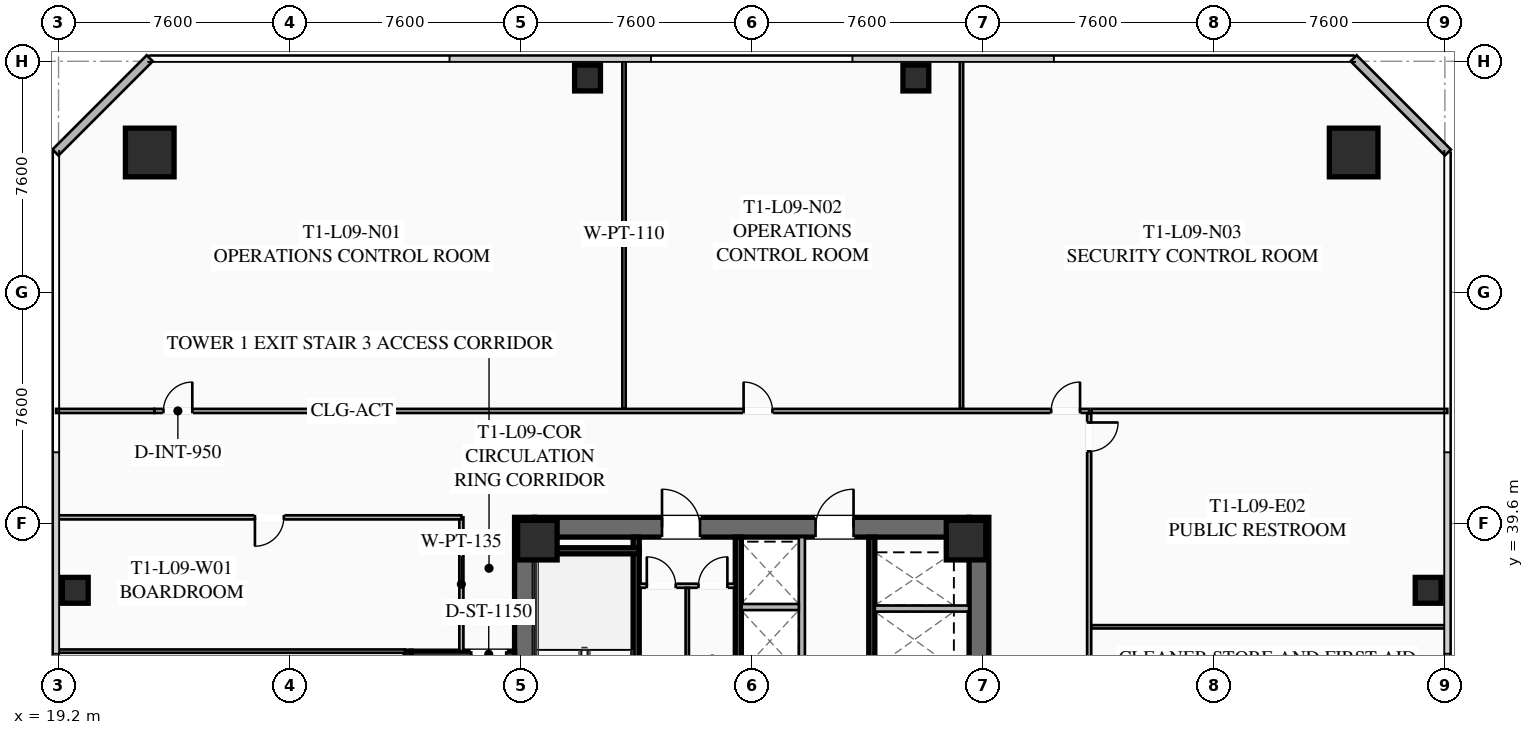
"""IFC4 building model, lengths in metres.
Left out: names, types, materials, properties, quantities, classifications, styles, units other than length and angle.
Written with IfcOpenShell. Run it as: python <this file> out.ifc"""

import sys

from ifc_helpers import new_model, si_unit, direction, frame, frame_2d, origin, origin_2d, place, context, subcontext, project, spatial, rectangle, hollow_rectangle, extrude, element, fill, save


model = new_model("IFC4")
c1 = context("Model", 3, precision=1e-05, world=origin(), true_north=direction((0.0, 1.0)))
c2 = subcontext(c1, "Body", "Model", "MODEL_VIEW")
j1 = project(units=[si_unit("LENGTHUNIT", "METRE"), si_unit("PLANEANGLEUNIT", "RADIAN")], contexts=[c1])
p1 = place(None, origin())
s1 = spatial("IfcSite", under=j1, at=p1, CompositionType="ELEMENT")
p2 = place(p1, origin())
s2 = spatial("IfcBuilding", under=s1, at=p2, CompositionType="ELEMENT")
p3 = place(p2, frame((0.0, 0.0, 38.8)))
s3 = spatial("IfcBuildingStorey", under=s2, at=p3, CompositionType="ELEMENT", Elevation=38.8)
for number, where, z_axis, x_axis in (
    (1, (34.525, 24.2, 0.0), (0.0, 0.0, 1.0), (0.0, 1.0, 0.0)),
    (2, (49.475, 39.8, 0.0), (0.0, 0.0, 1.0), (0.0, -1.0, 0.0)),
):
    element("IfcWall", number, at=place(p3, frame(where, z_axis=z_axis, x_axis=x_axis)), inside=s3, PredefinedType="SHEAR", context=c2, shape_type="SweptSolid", body=[
        extrude(rectangle(XDim=15.6, YDim=0.65, at=frame_2d((7.8, 0.0))), origin(), (0.0, 0.0, 1.0), 3.55),
    ])
p4 = place(p3, frame((34.85, 39.475, 0.0), z_axis=(0.0, 0.0, 1.0), x_axis=(1.0, 0.0, 0.0)))
e3 = element("IfcWall", 3, at=p4, inside=s3, PredefinedType="SHEAR", context=c2, shape_type="SweptSolid", body=[
    extrude(rectangle(XDim=14.3, YDim=0.65, at=frame_2d((7.15, 0.0))), origin(), (0.0, 0.0, 1.0), 3.55),
])
p5 = place(p4, frame((4.2, 0.0, 0.0)))
e4 = element("IfcOpeningElement", 4, at=p5, cuts=e3, PredefinedType="OPENING", context=c2, shape_type="SweptSolid", body=[
    extrude(rectangle(XDim=1.25, YDim=2.25, at=frame_2d((0.625, 1.125))), frame((0.0, 0.335, 0.0), z_axis=(0.0, -1.0, 0.0), x_axis=(1.0, 0.0, 0.0)), (0.0, 0.0, 1.0), 0.67),
])
p6 = place(p4, frame((9.25, 0.0, 0.0)))
e5 = element("IfcOpeningElement", 5, at=p6, cuts=e3, PredefinedType="OPENING", context=c2, shape_type="SweptSolid", body=[
    extrude(rectangle(XDim=1.25, YDim=2.25, at=frame_2d((0.625, 1.125))), frame((0.0, 0.335, 0.0), z_axis=(0.0, -1.0, 0.0), x_axis=(1.0, 0.0, 0.0)), (0.0, 0.0, 1.0), 0.67),
])
for number, where, z_axis, x_axis in (
    (6, (49.05, 39.05, 0.0), (0.0, 0.0, 1.0), (1.0, 0.0, 0.0)),
    (7, (34.95, 39.05, 0.0), (0.0, 0.0, 1.0), (1.0, 0.0, 0.0)),
):
    element("IfcColumn", number, at=place(p3, frame(where, z_axis=z_axis, x_axis=x_axis)), inside=s3, PredefinedType="COLUMN", context=c2, shape_type="SweptSolid", body=[
        extrude(hollow_rectangle(XDim=1.3, YDim=1.3, WallThickness=0.05, at=origin_2d()), origin(), (0.0, 0.0, 1.0), 3.35),
    ])
for number, where, z_axis, x_axis in (
    (8, (61.8, 51.8, 0.0), (0.0, 0.0, 1.0), (1.0, 0.0, 0.0)),
    (9, (22.2, 51.8, 0.0), (0.0, 0.0, 1.0), (1.0, 0.0, 0.0)),
):
    element("IfcColumn", number, at=place(p3, frame(where, z_axis=z_axis, x_axis=x_axis)), inside=s3, PredefinedType="COLUMN", context=c2, shape_type="SweptSolid", body=[
        extrude(hollow_rectangle(XDim=1.6, YDim=1.6, WallThickness=0.06, at=origin_2d()), origin(), (0.0, 0.0, 1.0), 3.35),
    ])
for number, where, z_axis, x_axis in (
    (10, (64.25, 37.4, 0.0), (0.0, 0.0, 1.0), (1.0, 0.0, 0.0)),
    (11, (47.4, 54.25, 0.0), (0.0, 0.0, 1.0), (1.0, 0.0, 0.0)),
    (12, (36.6, 54.25, 0.0), (0.0, 0.0, 1.0), (1.0, 0.0, 0.0)),
    (13, (19.75, 37.4, 0.0), (0.0, 0.0, 1.0), (1.0, 0.0, 0.0)),
):
    element("IfcColumn", number, at=place(p3, frame(where, z_axis=z_axis, x_axis=x_axis)), inside=s3, PredefinedType="COLUMN", context=c2, shape_type="SweptSolid", body=[
        extrude(hollow_rectangle(XDim=0.85, YDim=0.85, WallThickness=0.035, at=origin_2d()), origin(), (0.0, 0.0, 1.0), 3.35),
    ])
for number, where, z_axis, x_axis in (
    (14, (19.1, 51.8, 0.0), (0.0, 0.0, 1.0), (0.707, 0.707, 0.0)),
    (15, (61.8, 54.9, 0.0), (0.0, 0.0, 1.0), (0.707, -0.707, 0.0)),
):
    element("IfcWall", number, at=place(p3, frame(where, z_axis=z_axis, x_axis=x_axis)), inside=s3, PredefinedType="SOLIDWALL", context=c2, shape_type="SweptSolid", body=[
        extrude(rectangle(XDim=4.384, YDim=0.28, at=frame_2d((2.192, 0.0))), origin(), (0.0, 0.0, 1.0), 3.35),
    ])
p7 = place(p3, frame((38.2, 31.2, 0.0), z_axis=(0.0, 0.0, 1.0), x_axis=(0.0, 1.0, 0.0)))
e16 = element("IfcWall", 16, at=p7, inside=s3, PredefinedType="SHEAR", context=c2, shape_type="SweptSolid", body=[
    extrude(rectangle(XDim=7.95, YDim=0.2, at=frame_2d((3.975, 0.0))), origin(), (0.0, 0.0, 1.0), 3.35),
])
p8 = place(p7, frame((0.45, 0.0, 0.0)))
e17 = element("IfcOpeningElement", 17, at=p8, cuts=e16, PredefinedType="OPENING", context=c2, shape_type="SweptSolid", body=[
    extrude(rectangle(XDim=1.15, YDim=2.2, at=frame_2d((0.575, 1.1))), frame((0.0, 0.11, 0.0), z_axis=(0.0, -1.0, 0.0), x_axis=(1.0, 0.0, 0.0)), (0.0, 0.0, 1.0), 0.22),
])
p9 = place(p3, frame((34.85, 38.7, 0.0), z_axis=(0.0, 0.0, 1.0), x_axis=(1.0, 0.0, 0.0)))
e18 = element("IfcWall", 18, at=p9, inside=s3, PredefinedType="SHEAR", context=c2, shape_type="SweptSolid", body=[
    extrude(rectangle(XDim=3.45, YDim=0.2, at=frame_2d((1.725, 0.0))), origin(), (0.0, 0.0, 1.0), 3.35),
])
p10 = place(p3, frame((41.56, 24.85, 0.0), z_axis=(0.0, 0.0, 1.0), x_axis=(0.0, 1.0, 0.0)))
e19 = element("IfcWall", 19, at=p10, inside=s3, PredefinedType="SHEAR", context=c2, shape_type="SweptSolid", body=[
    extrude(rectangle(XDim=14.3, YDim=0.2, at=frame_2d((7.15, 0.0))), origin(), (0.0, 0.0, 1.0), 3.35),
])
p11 = place(p3, frame((45.95, 39.15, 0.0), z_axis=(0.0, 0.0, 1.0), x_axis=(0.0, -1.0, 0.0)))
e20 = element("IfcWall", 20, at=p11, inside=s3, PredefinedType="SHEAR", context=c2, shape_type="SweptSolid", body=[
    extrude(rectangle(XDim=6.35, YDim=0.2, at=frame_2d((3.175, 0.0))), origin(), (0.0, 0.0, 1.0), 3.35),
])
p12 = place(p3, frame((46.05, 36.8, 0.0), z_axis=(0.0, 0.0, 1.0), x_axis=(1.0, 0.0, 0.0)))
e21 = element("IfcWall", 21, at=p12, inside=s3, PredefinedType="SOLIDWALL", context=c2, shape_type="SweptSolid", body=[
    extrude(rectangle(XDim=3.1, YDim=0.2, at=frame_2d((1.55, 0.0))), origin(), (0.0, 0.0, 1.0), 3.35),
])
p13 = place(p3, frame((38.3, 37.55, 0.0), z_axis=(0.0, 0.0, 1.0), x_axis=(1.0, 0.0, 0.0)))
e22 = element("IfcWall", 22, at=p13, inside=s3, PredefinedType="PARTITIONING", context=c2, shape_type="SweptSolid", body=[
    extrude(rectangle(XDim=3.15, YDim=0.135, at=frame_2d((1.575, 0.0))), origin(), (0.0, 0.0, 1.0), 2.703),
])
p14 = place(p13, frame((0.25, 0.0, 0.0)))
e23 = element("IfcOpeningElement", 23, at=p14, cuts=e22, PredefinedType="OPENING", context=c2, shape_type="SweptSolid", body=[
    extrude(rectangle(XDim=0.95, YDim=2.05, at=frame_2d((0.475, 1.025))), frame((0.0, 0.077, 0.0), z_axis=(0.0, -1.0, 0.0), x_axis=(1.0, 0.0, 0.0)), (0.0, 0.0, 1.0), 0.155),
])
p15 = place(p13, frame((1.95, 0.0, 0.0)))
e24 = element("IfcOpeningElement", 24, at=p15, cuts=e22, PredefinedType="OPENING", context=c2, shape_type="SweptSolid", body=[
    extrude(rectangle(XDim=0.95, YDim=2.05, at=frame_2d((0.475, 1.025))), frame((0.0, 0.077, 0.0), z_axis=(0.0, -1.0, 0.0), x_axis=(1.0, 0.0, 0.0)), (0.0, 0.0, 1.0), 0.155),
])
p16 = place(p3, frame((39.88, 33.68, 0.0), z_axis=(0.0, 0.0, 1.0), x_axis=(0.0, 1.0, 0.0)))
e25 = element("IfcWall", 25, at=p16, inside=s3, PredefinedType="PARTITIONING", context=c2, shape_type="SweptSolid", body=[
    extrude(rectangle(XDim=3.8, YDim=0.11, at=frame_2d((1.9, 0.0))), origin(), (0.0, 0.0, 1.0), 2.703),
])
p17 = place(p3, frame((43.65, 32.35, 0.0), z_axis=(0.0, 0.0, 1.0), x_axis=(0.0, 1.0, 0.0)))
e26 = element("IfcWall", 26, at=p17, inside=s3, PredefinedType="SOLIDWALL", context=c2, shape_type="SweptSolid", body=[
    extrude(rectangle(XDim=6.8, YDim=0.2, at=frame_2d((3.4, 0.0))), origin(), (0.0, 0.0, 1.0), 3.35),
])
p18 = place(p3, frame((41.67, 36.85, 0.0), z_axis=(0.0, 0.0, 1.0), x_axis=(1.0, 0.0, 0.0)))
e27 = element("IfcWall", 27, at=p18, inside=s3, PredefinedType="SOLIDWALL", context=c2, shape_type="SweptSolid", body=[
    extrude(rectangle(XDim=1.88, YDim=0.2, at=frame_2d((0.94, 0.0))), origin(), (0.0, 0.0, 1.0), 3.35),
])
p19 = place(p3, frame((30.7, 28.6, 0.0), z_axis=(0.0, 0.0, 1.0), x_axis=(0.0, 1.0, 0.0)))
e28 = element("IfcWall", 28, at=p19, inside=s3, PredefinedType="SHEAR", context=c2, shape_type="SweptSolid", body=[
    extrude(rectangle(XDim=6.8, YDim=0.2, at=frame_2d((3.4, 0.0))), origin(), (0.0, 0.0, 1.0), 3.35),
])
p20 = place(p3, frame((34.2, 35.3, 0.0), z_axis=(0.0, 0.0, 1.0), x_axis=(-1.0, 0.0, 0.0)))
e29 = element("IfcWall", 29, at=p20, inside=s3, PredefinedType="SHEAR", context=c2, shape_type="SweptSolid", body=[
    extrude(rectangle(XDim=3.4, YDim=0.2, at=frame_2d((1.7, 0.0))), origin(), (0.0, 0.0, 1.0), 3.35),
])
p21 = place(p20, frame((0.275, 0.0, 0.0)))
e30 = element("IfcOpeningElement", 30, at=p21, cuts=e29, PredefinedType="OPENING", context=c2, shape_type="SweptSolid", body=[
    extrude(rectangle(XDim=1.15, YDim=2.2, at=frame_2d((0.575, 1.1))), frame((0.0, 0.11, 0.0), z_axis=(0.0, -1.0, 0.0), x_axis=(1.0, 0.0, 0.0)), (0.0, 0.0, 1.0), 0.22),
])
p22 = place(p3, frame((32.45, 35.4, 0.0), z_axis=(0.0, 0.0, 1.0), x_axis=(0.0, 1.0, 0.0)))
e31 = element("IfcWall", 31, at=p22, inside=s3, PredefinedType="PARTITIONING", context=c2, shape_type="SweptSolid", body=[
    extrude(rectangle(XDim=4.4, YDim=0.135, at=frame_2d((2.2, 0.0))), origin(), (0.0, 0.0, 1.0), 2.703),
])
p23 = place(p3, frame((22.35, 43.3, 0.0), z_axis=(0.0, 0.0, 1.0), x_axis=(1.0, 0.0, 0.0)))
e32 = element("IfcWall", 32, at=p23, inside=s3, PredefinedType="PARTITIONING", context=c2, shape_type="SweptSolid", body=[
    extrude(rectangle(XDim=30.75, YDim=0.135, at=frame_2d((15.375, 0.0))), origin(), (0.0, 0.0, 1.0), 2.703),
])
p24 = place(p23, frame((0.3, 0.0, 0.0)))
e33 = element("IfcOpeningElement", 33, at=p24, cuts=e32, PredefinedType="OPENING", context=c2, shape_type="SweptSolid", body=[
    extrude(rectangle(XDim=0.95, YDim=2.05, at=frame_2d((0.475, 1.025))), frame((0.0, 0.077, 0.0), z_axis=(0.0, -1.0, 0.0), x_axis=(1.0, 0.0, 0.0)), (0.0, 0.0, 1.0), 0.155),
])
p25 = place(p23, frame((19.383, 0.0, 0.0)))
e34 = element("IfcOpeningElement", 34, at=p25, cuts=e32, PredefinedType="OPENING", context=c2, shape_type="SweptSolid", body=[
    extrude(rectangle(XDim=0.95, YDim=2.05, at=frame_2d((0.475, 1.025))), frame((0.0, 0.077, 0.0), z_axis=(0.0, -1.0, 0.0), x_axis=(1.0, 0.0, 0.0)), (0.0, 0.0, 1.0), 0.155),
])
p26 = place(p23, frame((29.5, 0.0, 0.0)))
e35 = element("IfcOpeningElement", 35, at=p26, cuts=e32, PredefinedType="OPENING", context=c2, shape_type="SweptSolid", body=[
    extrude(rectangle(XDim=0.95, YDim=2.05, at=frame_2d((0.475, 1.025))), frame((0.0, 0.077, 0.0), z_axis=(0.0, -1.0, 0.0), x_axis=(1.0, 0.0, 0.0)), (0.0, 0.0, 1.0), 0.155),
])
p27 = place(p3, frame((19.12, 43.3, 0.0), z_axis=(0.0, 0.0, 1.0), x_axis=(1.0, 0.0, 0.0)))
e36 = element("IfcWall", 36, at=p27, inside=s3, PredefinedType="PARTITIONING", context=c2, shape_type="SweptSolid", body=[
    extrude(rectangle(XDim=3.23, YDim=0.135, at=frame_2d((1.615, 0.0))), origin(), (0.0, 0.0, 1.0), 2.703),
])
for number, where, z_axis, x_axis in (
    (37, (37.8, 43.38, 0.0), (0.0, 0.0, 1.0), (0.0, 1.0, 0.0)),
    (38, (48.9, 43.38, 0.0), (0.0, 0.0, 1.0), (0.0, 1.0, 0.0)),
):
    element("IfcWall", number, at=place(p3, frame(where, z_axis=z_axis, x_axis=x_axis)), inside=s3, PredefinedType="PARTITIONING", context=c2, shape_type="SweptSolid", body=[
        extrude(rectangle(XDim=11.5, YDim=0.11, at=frame_2d((5.75, 0.0))), origin(), (0.0, 0.0, 1.0), 2.703),
    ])
p28 = place(p3, frame((53.1, 43.22, 0.0), z_axis=(0.0, 0.0, 1.0), x_axis=(0.0, -1.0, 0.0)))
e39 = element("IfcWall", 39, at=p28, inside=s3, PredefinedType="PARTITIONING", context=c2, shape_type="SweptSolid", body=[
    extrude(rectangle(XDim=20.91, YDim=0.135, at=frame_2d((10.455, 0.0))), origin(), (0.0, 0.0, 1.0), 2.703),
])
p29 = place(p28, frame((10.653, 0.0, 0.0)))
e40 = element("IfcOpeningElement", 40, at=p29, cuts=e39, PredefinedType="OPENING", context=c2, shape_type="SweptSolid", body=[
    extrude(rectangle(XDim=0.95, YDim=2.05, at=frame_2d((0.475, 1.025))), frame((0.0, 0.077, 0.0), z_axis=(0.0, -1.0, 0.0), x_axis=(1.0, 0.0, 0.0)), (0.0, 0.0, 1.0), 0.155),
])
p30 = place(p28, frame((0.3, 0.0, 0.0)))
e41 = element("IfcOpeningElement", 41, at=p30, cuts=e39, PredefinedType="OPENING", context=c2, shape_type="SweptSolid", body=[
    extrude(rectangle(XDim=0.95, YDim=2.05, at=frame_2d((0.475, 1.025))), frame((0.0, 0.077, 0.0), z_axis=(0.0, -1.0, 0.0), x_axis=(1.0, 0.0, 0.0)), (0.0, 0.0, 1.0), 0.155),
])
p31 = place(p3, frame((64.88, 43.3, 0.0), z_axis=(0.0, 0.0, 1.0), x_axis=(-1.0, 0.0, 0.0)))
e42 = element("IfcWall", 42, at=p31, inside=s3, PredefinedType="PARTITIONING", context=c2, shape_type="SweptSolid", body=[
    extrude(rectangle(XDim=11.7, YDim=0.135, at=frame_2d((5.85, 0.0))), origin(), (0.0, 0.0, 1.0), 2.703),
])
p32 = place(p3, frame((53.18, 36.2, 0.0), z_axis=(0.0, 0.0, 1.0), x_axis=(1.0, 0.0, 0.0)))
e43 = element("IfcWall", 43, at=p32, inside=s3, PredefinedType="PARTITIONING", context=c2, shape_type="SweptSolid", body=[
    extrude(rectangle(XDim=11.7, YDim=0.11, at=frame_2d((5.85, 0.0))), origin(), (0.0, 0.0, 1.0), 2.703),
])
p33 = place(p3, frame((32.45, 39.8, 0.0), z_axis=(0.0, 0.0, 1.0), x_axis=(-1.0, 0.0, 0.0)))
e44 = element("IfcWall", 44, at=p33, inside=s3, PredefinedType="PARTITIONING", context=c2, shape_type="SweptSolid", body=[
    extrude(rectangle(XDim=13.33, YDim=0.135, at=frame_2d((6.665, 0.0))), origin(), (0.0, 0.0, 1.0), 2.703),
])
p34 = place(p33, frame((5.84, 0.0, 0.0)))
e45 = element("IfcOpeningElement", 45, at=p34, cuts=e44, PredefinedType="OPENING", context=c2, shape_type="SweptSolid", body=[
    extrude(rectangle(XDim=0.95, YDim=2.05, at=frame_2d((0.475, 1.025))), frame((0.0, 0.077, 0.0), z_axis=(0.0, -1.0, 0.0), x_axis=(1.0, 0.0, 0.0)), (0.0, 0.0, 1.0), 0.155),
])
p35 = place(p3, frame((30.6, 35.4, 0.0), z_axis=(0.0, 0.0, 1.0), x_axis=(-1.0, 0.0, 0.0)))
e46 = element("IfcWall", 46, at=p35, inside=s3, PredefinedType="PARTITIONING", context=c2, shape_type="SweptSolid", body=[
    extrude(rectangle(XDim=11.48, YDim=0.11, at=frame_2d((5.74, 0.0))), origin(), (0.0, 0.0, 1.0), 2.703),
])
p36 = place(p5, origin())
e47 = element("IfcDoor", 47, at=p36, inside=s3, OperationType="SINGLE_SWING_LEFT", PredefinedType="DOOR", context=c2, shape_type="SweptSolid", body=[
    extrude(rectangle(XDim=1.25, YDim=2.25, at=frame_2d((0.625, 1.125))), frame((0.0, 0.025, 0.0), z_axis=(0.0, -1.0, 0.0), x_axis=(1.0, 0.0, 0.0)), (0.0, 0.0, 1.0), 0.05),
])
fill(e4, e47)
p37 = place(p6, origin())
e48 = element("IfcDoor", 48, at=p37, inside=s3, OperationType="SINGLE_SWING_RIGHT", PredefinedType="DOOR", context=c2, shape_type="SweptSolid", body=[
    extrude(rectangle(XDim=1.25, YDim=2.25, at=frame_2d((0.625, 1.125))), frame((0.0, 0.025, 0.0), z_axis=(0.0, -1.0, 0.0), x_axis=(1.0, 0.0, 0.0)), (0.0, 0.0, 1.0), 0.05),
])
fill(e5, e48)
p38 = place(p14, origin())
e49 = element("IfcDoor", 49, at=p38, inside=s3, OperationType="SINGLE_SWING_LEFT", PredefinedType="DOOR", context=c2, shape_type="SweptSolid", body=[
    extrude(rectangle(XDim=0.95, YDim=2.05, at=frame_2d((0.475, 1.025))), frame((0.0, 0.025, 0.0), z_axis=(0.0, -1.0, 0.0), x_axis=(1.0, 0.0, 0.0)), (0.0, 0.0, 1.0), 0.05),
])
fill(e23, e49)
p39 = place(p15, origin())
e50 = element("IfcDoor", 50, at=p39, inside=s3, OperationType="SINGLE_SWING_RIGHT", PredefinedType="DOOR", context=c2, shape_type="SweptSolid", body=[
    extrude(rectangle(XDim=0.95, YDim=2.05, at=frame_2d((0.475, 1.025))), frame((0.0, 0.025, 0.0), z_axis=(0.0, -1.0, 0.0), x_axis=(1.0, 0.0, 0.0)), (0.0, 0.0, 1.0), 0.05),
])
fill(e24, e50)
p40 = place(p21, origin())
e51 = element("IfcDoor", 51, at=p40, inside=s3, OperationType="SINGLE_SWING_RIGHT", PredefinedType="DOOR", context=c2, shape_type="SweptSolid", body=[
    extrude(rectangle(XDim=1.15, YDim=2.2, at=frame_2d((0.575, 1.1))), frame((0.0, 0.025, 0.0), z_axis=(0.0, -1.0, 0.0), x_axis=(1.0, 0.0, 0.0)), (0.0, 0.0, 1.0), 0.05),
])
fill(e30, e51)
p41 = place(p24, origin())
e52 = element("IfcDoor", 52, at=p41, inside=s3, OperationType="SINGLE_SWING_RIGHT", PredefinedType="DOOR", context=c2, shape_type="SweptSolid", body=[
    extrude(rectangle(XDim=0.95, YDim=2.05, at=frame_2d((0.475, 1.025))), frame((0.0, 0.025, 0.0), z_axis=(0.0, -1.0, 0.0), x_axis=(1.0, 0.0, 0.0)), (0.0, 0.0, 1.0), 0.05),
])
fill(e33, e52)
p42 = place(p25, origin())
e53 = element("IfcDoor", 53, at=p42, inside=s3, OperationType="SINGLE_SWING_LEFT", PredefinedType="DOOR", context=c2, shape_type="SweptSolid", body=[
    extrude(rectangle(XDim=0.95, YDim=2.05, at=frame_2d((0.475, 1.025))), frame((0.0, 0.025, 0.0), z_axis=(0.0, -1.0, 0.0), x_axis=(1.0, 0.0, 0.0)), (0.0, 0.0, 1.0), 0.05),
])
fill(e34, e53)
p43 = place(p26, origin())
e54 = element("IfcDoor", 54, at=p43, inside=s3, OperationType="SINGLE_SWING_RIGHT", PredefinedType="DOOR", context=c2, shape_type="SweptSolid", body=[
    extrude(rectangle(XDim=0.95, YDim=2.05, at=frame_2d((0.475, 1.025))), frame((0.0, 0.025, 0.0), z_axis=(0.0, -1.0, 0.0), x_axis=(1.0, 0.0, 0.0)), (0.0, 0.0, 1.0), 0.05),
])
fill(e35, e54)
p44 = place(p30, origin())
e55 = element("IfcDoor", 55, at=p44, inside=s3, OperationType="SINGLE_SWING_LEFT", PredefinedType="DOOR", context=c2, shape_type="SweptSolid", body=[
    extrude(rectangle(XDim=0.95, YDim=2.05, at=frame_2d((0.475, 1.025))), frame((0.0, 0.025, 0.0), z_axis=(0.0, -1.0, 0.0), x_axis=(1.0, 0.0, 0.0)), (0.0, 0.0, 1.0), 0.05),
])
fill(e41, e55)
p45 = place(p34, origin())
e56 = element("IfcDoor", 56, at=p45, inside=s3, OperationType="SINGLE_SWING_RIGHT", PredefinedType="DOOR", context=c2, shape_type="SweptSolid", body=[
    extrude(rectangle(XDim=0.95, YDim=2.05, at=frame_2d((0.475, 1.025))), frame((0.0, 0.025, 0.0), z_axis=(0.0, -1.0, 0.0), x_axis=(1.0, 0.0, 0.0)), (0.0, 0.0, 1.0), 0.05),
])
fill(e45, e56)
save(model, sys.argv[1])
